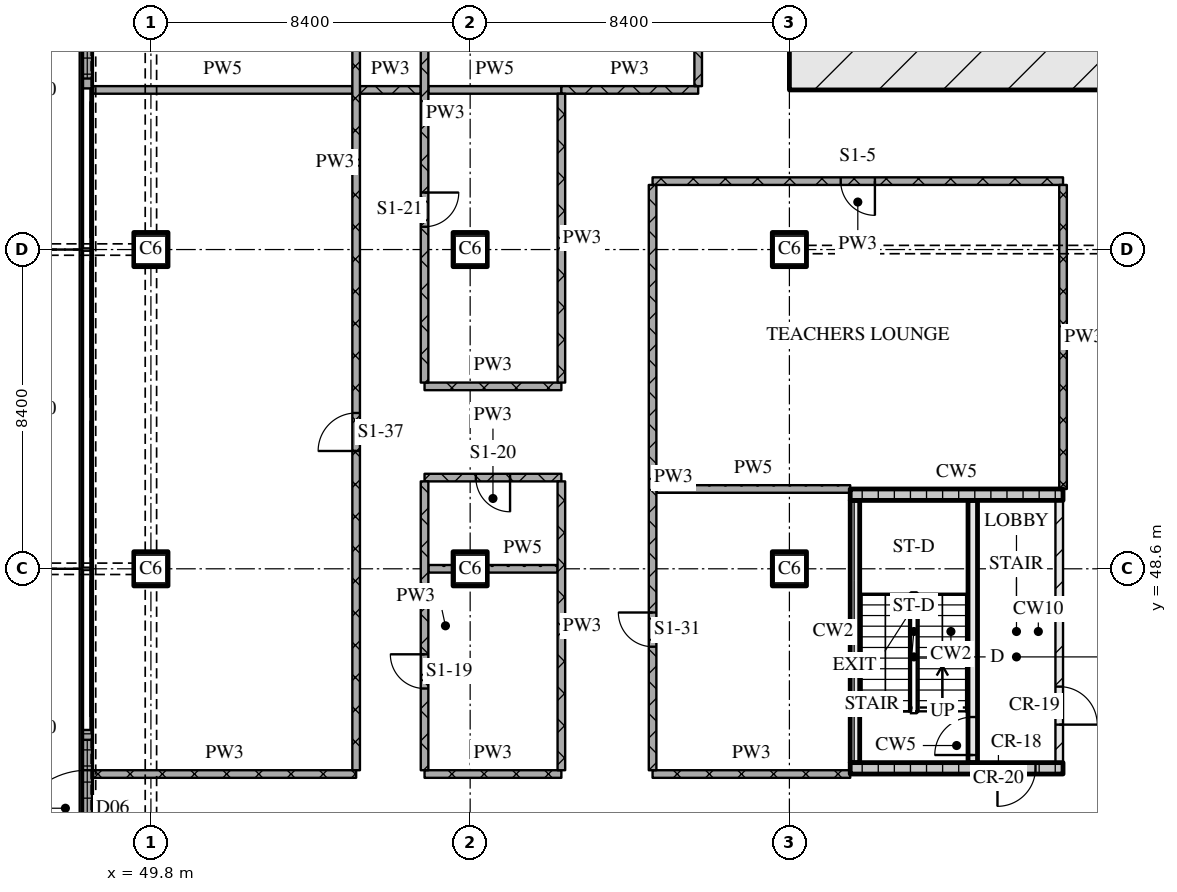
"""IFC4 building model, lengths in metres.
Left out: names, types, materials, properties, quantities, classifications, styles, units other than length and angle.
Written with IfcOpenShell. Run it as: python <this file> out.ifc"""

import sys

from ifc_helpers import new_model, si_unit, direction, frame, frame_2d, origin, origin_2d, place, context, subcontext, project, spatial, rectangle, extrude, element, fill, save


model = new_model("IFC4")
c1 = context("Model", 3, precision=1e-05, world=origin(), true_north=direction((0.0, 1.0)))
c2 = subcontext(c1, "Body", "Model", "MODEL_VIEW")
j1 = project(units=[si_unit("LENGTHUNIT", "METRE"), si_unit("PLANEANGLEUNIT", "RADIAN")], contexts=[c1])
p1 = place(None, origin())
s1 = spatial("IfcSite", under=j1, at=p1, CompositionType="ELEMENT")
p2 = place(p1, origin())
s2 = spatial("IfcBuilding", under=s1, at=p2, CompositionType="ELEMENT")
p3 = place(p2, frame((0.0, 0.0, 19.2)))
s3 = spatial("IfcBuildingStorey", under=s2, at=p3, CompositionType="ELEMENT", Elevation=19.2)
for number, where, z_axis, x_axis in (
    (1, (49.8, 48.6, 0.0), (0.0, 0.0, 1.0), (1.0, 0.0, 0.0)),
    (2, (49.8, 57.0, 0.0), (0.0, 0.0, 1.0), (1.0, 0.0, 0.0)),
    (3, (58.2, 48.6, 0.0), (0.0, 0.0, 1.0), (1.0, 0.0, 0.0)),
    (4, (58.2, 57.0, 0.0), (0.0, 0.0, 1.0), (1.0, 0.0, 0.0)),
    (5, (66.6, 48.6, 0.0), (0.0, 0.0, 1.0), (1.0, 0.0, 0.0)),
    (6, (66.6, 57.0, 0.0), (0.0, 0.0, 1.0), (1.0, 0.0, 0.0)),
):
    element("IfcColumn", number, at=place(p3, frame(where, z_axis=z_axis, x_axis=x_axis)), inside=s3, PredefinedType="COLUMN", context=c2, shape_type="SweptSolid", body=[
        extrude(rectangle(XDim=0.9, YDim=0.9, at=origin_2d()), origin(), (0.0, 0.0, 1.0), 4.5),
    ])
p4 = place(p3, frame((48.125, 40.24, 0.0), z_axis=(0.0, 0.0, 1.0), x_axis=(0.0, 1.0, 0.0)))
e7 = element("IfcWall", 7, at=p4, inside=s3, PredefinedType="SOLIDWALL", context=c2, shape_type="SweptSolid", body=[
    extrude(rectangle(XDim=4.12, YDim=0.25, at=frame_2d((2.06, 0.0))), origin(), (0.0, 0.0, 1.0), 4.2),
])
p5 = place(p4, frame((1.06, 0.0, 0.0)))
e8 = element("IfcOpeningElement", 8, at=p5, cuts=e7, PredefinedType="OPENING", context=c2, shape_type="SweptSolid", body=[
    extrude(rectangle(XDim=2.0, YDim=2.4, at=frame_2d((1.0, 1.2))), frame((0.0, 0.135, 0.0), z_axis=(0.0, -1.0, 0.0), x_axis=(1.0, 0.0, 0.0)), (0.0, 0.0, 1.0), 0.27),
])
p6 = place(p4, frame((0.26, 0.0, 2.7)))
e9 = element("IfcOpeningElement", 9, at=p6, cuts=e7, PredefinedType="OPENING", context=c2, shape_type="SweptSolid", body=[
    extrude(rectangle(XDim=3.6, YDim=1.1, at=frame_2d((1.8, 0.55))), frame((0.0, 0.135, 0.0), z_axis=(0.0, -1.0, 0.0), x_axis=(1.0, 0.0, 0.0)), (0.0, 0.0, 1.0), 0.27),
])
p7 = place(p3, frame((48.125, 61.24, 0.0), z_axis=(0.0, 0.0, 1.0), x_axis=(0.0, 1.0, 0.0)))
e10 = element("IfcWall", 10, at=p7, inside=s3, PredefinedType="SOLIDWALL", context=c2, shape_type="SweptSolid", body=[
    extrude(rectangle(XDim=4.12, YDim=0.25, at=frame_2d((2.06, 0.0))), origin(), (0.0, 0.0, 1.0), 4.2),
])
p8 = place(p7, frame((1.06, 0.0, 0.0)))
e11 = element("IfcOpeningElement", 11, at=p8, cuts=e10, PredefinedType="OPENING", context=c2, shape_type="SweptSolid", body=[
    extrude(rectangle(XDim=2.0, YDim=2.4, at=frame_2d((1.0, 1.2))), frame((0.0, 0.135, 0.0), z_axis=(0.0, -1.0, 0.0), x_axis=(1.0, 0.0, 0.0)), (0.0, 0.0, 1.0), 0.27),
])
p9 = place(p7, frame((0.26, 0.0, 2.7)))
e12 = element("IfcOpeningElement", 12, at=p9, cuts=e10, PredefinedType="OPENING", context=c2, shape_type="SweptSolid", body=[
    extrude(rectangle(XDim=3.6, YDim=1.1, at=frame_2d((1.8, 0.55))), frame((0.0, 0.135, 0.0), z_axis=(0.0, -1.0, 0.0), x_axis=(1.0, 0.0, 0.0)), (0.0, 0.0, 1.0), 0.27),
])
p10 = place(p3, frame((66.6, 61.8, 0.0), z_axis=(0.0, 0.0, 1.0), x_axis=(1.0, 0.0, 0.0)))
e13 = element("IfcWall", 13, at=p10, inside=s3, PredefinedType="SOLIDWALL", context=c2, shape_type="SweptSolid", body=[
    extrude(rectangle(XDim=42.0, YDim=1.2, at=frame_2d((21.0, 0.0))), origin(), (0.0, 0.0, 1.0), 4.2),
])
p11 = place(p10, frame((21.35, 0.0, 0.0)))
e14 = element("IfcOpeningElement", 14, at=p11, cuts=e13, PredefinedType="OPENING", context=c2, shape_type="SweptSolid", body=[
    extrude(rectangle(XDim=1.8, YDim=2.1, at=frame_2d((0.9, 1.05))), frame((0.0, 0.61, 0.0), z_axis=(0.0, -1.0, 0.0), x_axis=(1.0, 0.0, 0.0)), (0.0, 0.0, 1.0), 1.22),
])
p12 = place(p3, frame((68.2, 43.35, 0.0), z_axis=(0.0, 0.0, 1.0), x_axis=(1.0, 0.0, 0.0)))
e15 = element("IfcWall", 15, at=p12, inside=s3, PredefinedType="SOLIDWALL", context=c2, shape_type="SweptSolid", body=[
    extrude(rectangle(XDim=5.6, YDim=0.3, at=frame_2d((2.8, 0.0))), origin(), (0.0, 0.0, 1.0), 4.2),
])
p13 = place(p12, frame((3.875, 0.0, 0.0)))
e16 = element("IfcOpeningElement", 16, at=p13, cuts=e15, PredefinedType="OPENING", context=c2, shape_type="SweptSolid", body=[
    extrude(rectangle(XDim=1.0, YDim=2.1, at=frame_2d((0.5, 1.05))), frame((0.0, 0.16, 0.0), z_axis=(0.0, -1.0, 0.0), x_axis=(1.0, 0.0, 0.0)), (0.0, 0.0, 1.0), 0.32),
])
p14 = place(p3, frame((68.325, 43.5, 0.0), z_axis=(0.0, 0.0, 1.0), x_axis=(0.0, 1.0, 0.0)))
e17 = element("IfcWall", 17, at=p14, inside=s3, PredefinedType="SOLIDWALL", context=c2, shape_type="SweptSolid", body=[
    extrude(rectangle(XDim=6.9, YDim=0.25, at=frame_2d((3.45, 0.0))), origin(), (0.0, 0.0, 1.0), 4.2),
])
p15 = place(p3, frame((71.425, 43.5, 0.0), z_axis=(0.0, 0.0, 1.0), x_axis=(0.0, 1.0, 0.0)))
e18 = element("IfcWall", 18, at=p15, inside=s3, PredefinedType="SOLIDWALL", context=c2, shape_type="SweptSolid", body=[
    extrude(rectangle(XDim=6.9, YDim=0.25, at=frame_2d((3.45, 0.0))), origin(), (0.0, 0.0, 1.0), 4.2),
])
p16 = place(p15, frame((0.2, 0.0, 0.0)))
e19 = element("IfcOpeningElement", 19, at=p16, cuts=e18, PredefinedType="OPENING", context=c2, shape_type="SweptSolid", body=[
    extrude(rectangle(XDim=1.0, YDim=2.1, at=frame_2d((0.5, 1.05))), frame((0.0, 0.135, 0.0), z_axis=(0.0, -1.0, 0.0), x_axis=(1.0, 0.0, 0.0)), (0.0, 0.0, 1.0), 0.27),
])
p17 = place(p3, frame((73.7, 43.5, 0.0), z_axis=(0.0, 0.0, 1.0), x_axis=(0.0, 1.0, 0.0)))
e20 = element("IfcWall", 20, at=p17, inside=s3, PredefinedType="PARTITIONING", context=c2, shape_type="SweptSolid", body=[
    extrude(rectangle(XDim=6.9, YDim=0.2, at=frame_2d((3.45, 0.0))), origin(), (0.0, 0.0, 1.0), 4.2),
])
p18 = place(p17, frame((1.0, 0.0, 0.0)))
e21 = element("IfcOpeningElement", 21, at=p18, cuts=e20, PredefinedType="OPENING", context=c2, shape_type="SweptSolid", body=[
    extrude(rectangle(XDim=1.0, YDim=2.1, at=frame_2d((0.5, 1.05))), frame((0.0, 0.11, 0.0), z_axis=(0.0, -1.0, 0.0), x_axis=(1.0, 0.0, 0.0)), (0.0, 0.0, 1.0), 0.22),
])
p19 = place(p3, frame((68.2, 50.55, 0.0), z_axis=(0.0, 0.0, 1.0), x_axis=(1.0, 0.0, 0.0)))
e22 = element("IfcWall", 22, at=p19, inside=s3, PredefinedType="SOLIDWALL", context=c2, shape_type="SweptSolid", body=[
    extrude(rectangle(XDim=5.6, YDim=0.3, at=frame_2d((2.8, 0.0))), origin(), (0.0, 0.0, 1.0), 4.2),
])
p20 = place(p3, frame((48.28, 43.2, 0.0), z_axis=(0.0, 0.0, 1.0), x_axis=(1.0, 0.0, 0.0)))
e23 = element("IfcWall", 23, at=p20, inside=s3, PredefinedType="PARTITIONING", context=c2, shape_type="SweptSolid", body=[
    extrude(rectangle(XDim=6.92, YDim=0.2, at=frame_2d((3.46, 0.0))), origin(), (0.0, 0.0, 1.0), 4.2),
])
p21 = place(p3, frame((57.0, 43.2, 0.0), z_axis=(0.0, 0.0, 1.0), x_axis=(1.0, 0.0, 0.0)))
e24 = element("IfcWall", 24, at=p21, inside=s3, PredefinedType="PARTITIONING", context=c2, shape_type="SweptSolid", body=[
    extrude(rectangle(XDim=3.6, YDim=0.2, at=frame_2d((1.8, 0.0))), origin(), (0.0, 0.0, 1.0), 4.2),
])
p22 = place(p3, frame((63.0, 43.2, 0.0), z_axis=(0.0, 0.0, 1.0), x_axis=(1.0, 0.0, 0.0)))
e25 = element("IfcWall", 25, at=p22, inside=s3, PredefinedType="PARTITIONING", context=c2, shape_type="SweptSolid", body=[
    extrude(rectangle(XDim=5.2, YDim=0.2, at=frame_2d((2.6, 0.0))), origin(), (0.0, 0.0, 1.0), 4.2),
])
p23 = place(p3, frame((57.1, 48.6, 0.0), z_axis=(0.0, 0.0, 1.0), x_axis=(1.0, 0.0, 0.0)))
e26 = element("IfcWall", 26, at=p23, inside=s3, PredefinedType="PARTITIONING", context=c2, shape_type="SweptSolid", body=[
    extrude(rectangle(XDim=0.63, YDim=0.2, at=frame_2d((0.315, 0.0))), origin(), (0.0, 0.0, 1.0), 4.2),
])
p24 = place(p3, frame((58.67, 48.6, 0.0), z_axis=(0.0, 0.0, 1.0), x_axis=(1.0, 0.0, 0.0)))
e27 = element("IfcWall", 27, at=p24, inside=s3, PredefinedType="PARTITIONING", context=c2, shape_type="SweptSolid", body=[
    extrude(rectangle(XDim=1.83, YDim=0.2, at=frame_2d((0.915, 0.0))), origin(), (0.0, 0.0, 1.0), 4.2),
])
p25 = place(p3, frame((63.1, 50.7, 0.0), z_axis=(0.0, 0.0, 1.0), x_axis=(1.0, 0.0, 0.0)))
e28 = element("IfcWall", 28, at=p25, inside=s3, PredefinedType="PARTITIONING", context=c2, shape_type="SweptSolid", body=[
    extrude(rectangle(XDim=5.1, YDim=0.2, at=frame_2d((2.55, 0.0))), origin(), (0.0, 0.0, 1.0), 4.2),
])
p26 = place(p3, frame((60.6, 51.0, 0.0), z_axis=(0.0, 0.0, 1.0), x_axis=(-1.0, 0.0, 0.0)))
e29 = element("IfcWall", 29, at=p26, inside=s3, PredefinedType="PARTITIONING", context=c2, shape_type="SweptSolid", body=[
    extrude(rectangle(XDim=3.6, YDim=0.2, at=frame_2d((1.8, 0.0))), origin(), (0.0, 0.0, 1.0), 4.2),
])
p27 = place(p26, frame((1.35, 0.0, 0.0)))
e30 = element("IfcOpeningElement", 30, at=p27, cuts=e29, PredefinedType="OPENING", context=c2, shape_type="SweptSolid", body=[
    extrude(rectangle(XDim=0.9, YDim=2.1, at=frame_2d((0.45, 1.05))), frame((0.0, 0.11, 0.0), z_axis=(0.0, -1.0, 0.0), x_axis=(1.0, 0.0, 0.0)), (0.0, 0.0, 1.0), 0.22),
])
p28 = place(p3, frame((57.0, 53.4, 0.0), z_axis=(0.0, 0.0, 1.0), x_axis=(1.0, 0.0, 0.0)))
e31 = element("IfcWall", 31, at=p28, inside=s3, PredefinedType="PARTITIONING", context=c2, shape_type="SweptSolid", body=[
    extrude(rectangle(XDim=3.6, YDim=0.2, at=frame_2d((1.8, 0.0))), origin(), (0.0, 0.0, 1.0), 4.2),
])
p29 = place(p3, frame((73.8, 58.8, 0.0), z_axis=(0.0, 0.0, 1.0), x_axis=(-1.0, 0.0, 0.0)))
e32 = element("IfcWall", 32, at=p29, inside=s3, PredefinedType="PARTITIONING", context=c2, shape_type="SweptSolid", body=[
    extrude(rectangle(XDim=10.8, YDim=0.2, at=frame_2d((5.4, 0.0))), origin(), (0.0, 0.0, 1.0), 4.2),
])
p30 = place(p29, frame((4.95, 0.0, 0.0)))
e33 = element("IfcOpeningElement", 33, at=p30, cuts=e32, PredefinedType="OPENING", context=c2, shape_type="SweptSolid", body=[
    extrude(rectangle(XDim=0.9, YDim=2.1, at=frame_2d((0.45, 1.05))), frame((0.0, 0.11, 0.0), z_axis=(0.0, -1.0, 0.0), x_axis=(1.0, 0.0, 0.0)), (0.0, 0.0, 1.0), 0.22),
])
p31 = place(p3, frame((55.3, 61.2, 0.0), z_axis=(0.0, 0.0, 1.0), x_axis=(1.0, 0.0, 0.0)))
e34 = element("IfcWall", 34, at=p31, inside=s3, PredefinedType="PARTITIONING", context=c2, shape_type="SweptSolid", body=[
    extrude(rectangle(XDim=1.6, YDim=0.2, at=frame_2d((0.8, 0.0))), origin(), (0.0, 0.0, 1.0), 4.2),
])
p32 = place(p3, frame((60.6, 61.2, 0.0), z_axis=(0.0, 0.0, 1.0), x_axis=(1.0, 0.0, 0.0)))
e35 = element("IfcWall", 35, at=p32, inside=s3, PredefinedType="PARTITIONING", context=c2, shape_type="SweptSolid", body=[
    extrude(rectangle(XDim=3.6, YDim=0.2, at=frame_2d((1.8, 0.0))), origin(), (0.0, 0.0, 1.0), 4.2),
])
p33 = place(p3, frame((48.28, 61.2, 0.0), z_axis=(0.0, 0.0, 1.0), x_axis=(1.0, 0.0, 0.0)))
e36 = element("IfcWall", 36, at=p33, inside=s3, PredefinedType="PARTITIONING", context=c2, shape_type="SweptSolid", body=[
    extrude(rectangle(XDim=6.82, YDim=0.2, at=frame_2d((3.41, 0.0))), origin(), (0.0, 0.0, 1.0), 4.2),
])
p34 = place(p3, frame((57.1, 61.2, 0.0), z_axis=(0.0, 0.0, 1.0), x_axis=(1.0, 0.0, 0.0)))
e37 = element("IfcWall", 37, at=p34, inside=s3, PredefinedType="PARTITIONING", context=c2, shape_type="SweptSolid", body=[
    extrude(rectangle(XDim=3.5, YDim=0.2, at=frame_2d((1.75, 0.0))), origin(), (0.0, 0.0, 1.0), 4.2),
])
p35 = place(p3, frame((55.2, 43.3, 0.0), z_axis=(0.0, 0.0, 1.0), x_axis=(0.0, 1.0, 0.0)))
e38 = element("IfcWall", 38, at=p35, inside=s3, PredefinedType="PARTITIONING", context=c2, shape_type="SweptSolid", body=[
    extrude(rectangle(XDim=32.02, YDim=0.2, at=frame_2d((16.01, 0.0))), origin(), (0.0, 0.0, 1.0), 4.2),
])
p36 = place(p35, frame((8.4, 0.0, 0.0)))
e39 = element("IfcOpeningElement", 39, at=p36, cuts=e38, PredefinedType="OPENING", context=c2, shape_type="SweptSolid", body=[
    extrude(rectangle(XDim=1.0, YDim=2.1, at=frame_2d((0.5, 1.05))), frame((0.0, 0.11, 0.0), z_axis=(0.0, -1.0, 0.0), x_axis=(1.0, 0.0, 0.0)), (0.0, 0.0, 1.0), 0.22),
])
p37 = place(p35, frame((21.6, 0.0, 0.0)))
e40 = element("IfcOpeningElement", 40, at=p37, cuts=e38, PredefinedType="OPENING", context=c2, shape_type="SweptSolid", body=[
    extrude(rectangle(XDim=1.0, YDim=2.1, at=frame_2d((0.5, 1.05))), frame((0.0, 0.11, 0.0), z_axis=(0.0, -1.0, 0.0), x_axis=(1.0, 0.0, 0.0)), (0.0, 0.0, 1.0), 0.22),
])
p38 = place(p35, frame((28.179, 0.0, 0.0)))
e41 = element("IfcOpeningElement", 41, at=p38, cuts=e38, PredefinedType="OPENING", context=c2, shape_type="SweptSolid", body=[
    extrude(rectangle(XDim=1.0, YDim=2.1, at=frame_2d((0.5, 1.05))), frame((0.0, 0.11, 0.0), z_axis=(0.0, -1.0, 0.0), x_axis=(1.0, 0.0, 0.0)), (0.0, 0.0, 1.0), 0.22),
])
p39 = place(p3, frame((57.0, 50.9, 0.0), z_axis=(0.0, 0.0, 1.0), x_axis=(0.0, -1.0, 0.0)))
e42 = element("IfcWall", 42, at=p39, inside=s3, PredefinedType="PARTITIONING", context=c2, shape_type="SweptSolid", body=[
    extrude(rectangle(XDim=7.6, YDim=0.2, at=frame_2d((3.8, 0.0))), origin(), (0.0, 0.0, 1.0), 4.2),
])
p40 = place(p39, frame((4.55, 0.0, 0.0)))
e43 = element("IfcOpeningElement", 43, at=p40, cuts=e42, PredefinedType="OPENING", context=c2, shape_type="SweptSolid", body=[
    extrude(rectangle(XDim=0.9, YDim=2.1, at=frame_2d((0.45, 1.05))), frame((0.0, 0.11, 0.0), z_axis=(0.0, -1.0, 0.0), x_axis=(1.0, 0.0, 0.0)), (0.0, 0.0, 1.0), 0.22),
])
p41 = place(p3, frame((57.0, 67.7, 0.0), z_axis=(0.0, 0.0, 1.0), x_axis=(0.0, -1.0, 0.0)))
e44 = element("IfcWall", 44, at=p41, inside=s3, PredefinedType="PARTITIONING", context=c2, shape_type="SweptSolid", body=[
    extrude(rectangle(XDim=14.2, YDim=0.2, at=frame_2d((7.1, 0.0))), origin(), (0.0, 0.0, 1.0), 4.2),
])
p42 = place(p41, frame((9.2, 0.0, 0.0)))
e45 = element("IfcOpeningElement", 45, at=p42, cuts=e44, PredefinedType="OPENING", context=c2, shape_type="SweptSolid", body=[
    extrude(rectangle(XDim=0.9, YDim=2.1, at=frame_2d((0.45, 1.05))), frame((0.0, 0.11, 0.0), z_axis=(0.0, -1.0, 0.0), x_axis=(1.0, 0.0, 0.0)), (0.0, 0.0, 1.0), 0.22),
])
p43 = place(p3, frame((60.6, 50.9, 0.0), z_axis=(0.0, 0.0, 1.0), x_axis=(0.0, -1.0, 0.0)))
e46 = element("IfcWall", 46, at=p43, inside=s3, PredefinedType="PARTITIONING", context=c2, shape_type="SweptSolid", body=[
    extrude(rectangle(XDim=7.6, YDim=0.2, at=frame_2d((3.8, 0.0))), origin(), (0.0, 0.0, 1.0), 4.2),
])
p44 = place(p3, frame((60.6, 61.1, 0.0), z_axis=(0.0, 0.0, 1.0), x_axis=(0.0, -1.0, 0.0)))
e47 = element("IfcWall", 47, at=p44, inside=s3, PredefinedType="PARTITIONING", context=c2, shape_type="SweptSolid", body=[
    extrude(rectangle(XDim=7.6, YDim=0.2, at=frame_2d((3.8, 0.0))), origin(), (0.0, 0.0, 1.0), 4.2),
])
p45 = place(p3, frame((63.0, 58.7, 0.0), z_axis=(0.0, 0.0, 1.0), x_axis=(0.0, -1.0, 0.0)))
e48 = element("IfcWall", 48, at=p45, inside=s3, PredefinedType="PARTITIONING", context=c2, shape_type="SweptSolid", body=[
    extrude(rectangle(XDim=15.4, YDim=0.2, at=frame_2d((7.7, 0.0))), origin(), (0.0, 0.0, 1.0), 4.2),
])
p46 = place(p45, frame((11.25, 0.0, 0.0)))
e49 = element("IfcOpeningElement", 49, at=p46, cuts=e48, PredefinedType="OPENING", context=c2, shape_type="SweptSolid", body=[
    extrude(rectangle(XDim=0.9, YDim=2.1, at=frame_2d((0.45, 1.05))), frame((0.0, 0.11, 0.0), z_axis=(0.0, -1.0, 0.0), x_axis=(1.0, 0.0, 0.0)), (0.0, 0.0, 1.0), 0.22),
])
p47 = place(p3, frame((64.2, 67.7, 0.0), z_axis=(0.0, 0.0, 1.0), x_axis=(0.0, -1.0, 0.0)))
e50 = element("IfcWall", 50, at=p47, inside=s3, PredefinedType="PARTITIONING", context=c2, shape_type="SweptSolid", body=[
    extrude(rectangle(XDim=6.4, YDim=0.2, at=frame_2d((3.2, 0.0))), origin(), (0.0, 0.0, 1.0), 4.2),
])
p48 = place(p3, frame((73.8, 58.7, 0.0), z_axis=(0.0, 0.0, 1.0), x_axis=(0.0, -1.0, 0.0)))
e51 = element("IfcWall", 51, at=p48, inside=s3, PredefinedType="PARTITIONING", context=c2, shape_type="SweptSolid", body=[
    extrude(rectangle(XDim=8.0, YDim=0.2, at=frame_2d((4.0, 0.0))), origin(), (0.0, 0.0, 1.0), 4.2),
])
p49 = place(p5, origin())
e52 = element("IfcDoor", 52, at=p49, inside=s3, OperationType="DOUBLE_DOOR_SINGLE_SWING", PredefinedType="DOOR", context=c2, shape_type="SweptSolid", body=[
    extrude(rectangle(XDim=2.0, YDim=2.4, at=frame_2d((1.0, 1.2))), frame((0.0, 0.025, 0.0), z_axis=(0.0, -1.0, 0.0), x_axis=(1.0, 0.0, 0.0)), (0.0, 0.0, 1.0), 0.05),
])
fill(e8, e52)
p50 = place(p6, origin())
e53 = element("IfcWindow", 53, at=p50, inside=s3, PartitioningType="SINGLE_PANEL", PredefinedType="WINDOW", context=c2, shape_type="SweptSolid", body=[
    extrude(rectangle(XDim=3.6, YDim=1.1, at=frame_2d((1.8, 0.55))), frame((0.0, 0.03, 0.0), z_axis=(0.0, -1.0, 0.0), x_axis=(1.0, 0.0, 0.0)), (0.0, 0.0, 1.0), 0.06),
])
fill(e9, e53)
p51 = place(p9, origin())
e54 = element("IfcWindow", 54, at=p51, inside=s3, PartitioningType="SINGLE_PANEL", PredefinedType="WINDOW", context=c2, shape_type="SweptSolid", body=[
    extrude(rectangle(XDim=3.6, YDim=1.1, at=frame_2d((1.8, 0.55))), frame((0.0, 0.03, 0.0), z_axis=(0.0, -1.0, 0.0), x_axis=(1.0, 0.0, 0.0)), (0.0, 0.0, 1.0), 0.06),
])
fill(e12, e54)
p52 = place(p13, origin())
e55 = element("IfcDoor", 55, at=p52, inside=s3, OperationType="SINGLE_SWING_RIGHT", PredefinedType="DOOR", context=c2, shape_type="SweptSolid", body=[
    extrude(rectangle(XDim=1.0, YDim=2.1, at=frame_2d((0.5, 1.05))), frame((0.0, 0.025, 0.0), z_axis=(0.0, -1.0, 0.0), x_axis=(1.0, 0.0, 0.0)), (0.0, 0.0, 1.0), 0.05),
])
fill(e16, e55)
p53 = place(p16, origin())
e56 = element("IfcDoor", 56, at=p53, inside=s3, OperationType="SINGLE_SWING_LEFT", PredefinedType="DOOR", context=c2, shape_type="SweptSolid", body=[
    extrude(rectangle(XDim=1.0, YDim=2.1, at=frame_2d((0.5, 1.05))), frame((0.0, 0.025, 0.0), z_axis=(0.0, -1.0, 0.0), x_axis=(1.0, 0.0, 0.0)), (0.0, 0.0, 1.0), 0.05),
])
fill(e19, e56)
p54 = place(p18, origin())
e57 = element("IfcDoor", 57, at=p54, inside=s3, OperationType="SINGLE_SWING_RIGHT", PredefinedType="DOOR", context=c2, shape_type="SweptSolid", body=[
    extrude(rectangle(XDim=1.0, YDim=2.1, at=frame_2d((0.5, 1.05))), frame((0.0, 0.025, 0.0), z_axis=(0.0, -1.0, 0.0), x_axis=(1.0, 0.0, 0.0)), (0.0, 0.0, 1.0), 0.05),
])
fill(e21, e57)
p55 = place(p27, origin())
e58 = element("IfcDoor", 58, at=p55, inside=s3, OperationType="SINGLE_SWING_LEFT", PredefinedType="DOOR", context=c2, shape_type="SweptSolid", body=[
    extrude(rectangle(XDim=0.9, YDim=2.1, at=frame_2d((0.45, 1.05))), frame((0.0, 0.025, 0.0), z_axis=(0.0, -1.0, 0.0), x_axis=(1.0, 0.0, 0.0)), (0.0, 0.0, 1.0), 0.05),
])
fill(e30, e58)
p56 = place(p30, origin())
e59 = element("IfcDoor", 59, at=p56, inside=s3, OperationType="SINGLE_SWING_LEFT", PredefinedType="DOOR", context=c2, shape_type="SweptSolid", body=[
    extrude(rectangle(XDim=0.9, YDim=2.1, at=frame_2d((0.45, 1.05))), frame((0.0, 0.025, 0.0), z_axis=(0.0, -1.0, 0.0), x_axis=(1.0, 0.0, 0.0)), (0.0, 0.0, 1.0), 0.05),
])
fill(e33, e59)
p57 = place(p36, origin())
e60 = element("IfcDoor", 60, at=p57, inside=s3, OperationType="SINGLE_SWING_LEFT", PredefinedType="DOOR", context=c2, shape_type="SweptSolid", body=[
    extrude(rectangle(XDim=1.0, YDim=2.1, at=frame_2d((0.5, 1.05))), frame((0.0, 0.025, 0.0), z_axis=(0.0, -1.0, 0.0), x_axis=(1.0, 0.0, 0.0)), (0.0, 0.0, 1.0), 0.05),
])
fill(e39, e60)
p58 = place(p40, origin())
e61 = element("IfcDoor", 61, at=p58, inside=s3, OperationType="SINGLE_SWING_RIGHT", PredefinedType="DOOR", context=c2, shape_type="SweptSolid", body=[
    extrude(rectangle(XDim=0.9, YDim=2.1, at=frame_2d((0.45, 1.05))), frame((0.0, 0.025, 0.0), z_axis=(0.0, -1.0, 0.0), x_axis=(1.0, 0.0, 0.0)), (0.0, 0.0, 1.0), 0.05),
])
fill(e43, e61)
p59 = place(p42, origin())
e62 = element("IfcDoor", 62, at=p59, inside=s3, OperationType="SINGLE_SWING_LEFT", PredefinedType="DOOR", context=c2, shape_type="SweptSolid", body=[
    extrude(rectangle(XDim=0.9, YDim=2.1, at=frame_2d((0.45, 1.05))), frame((0.0, 0.025, 0.0), z_axis=(0.0, -1.0, 0.0), x_axis=(1.0, 0.0, 0.0)), (0.0, 0.0, 1.0), 0.05),
])
fill(e45, e62)
p60 = place(p46, origin())
e63 = element("IfcDoor", 63, at=p60, inside=s3, OperationType="SINGLE_SWING_RIGHT", PredefinedType="DOOR", context=c2, shape_type="SweptSolid", body=[
    extrude(rectangle(XDim=0.9, YDim=2.1, at=frame_2d((0.45, 1.05))), frame((0.0, 0.025, 0.0), z_axis=(0.0, -1.0, 0.0), x_axis=(1.0, 0.0, 0.0)), (0.0, 0.0, 1.0), 0.05),
])
fill(e49, e63)
save(model, sys.argv[1])
